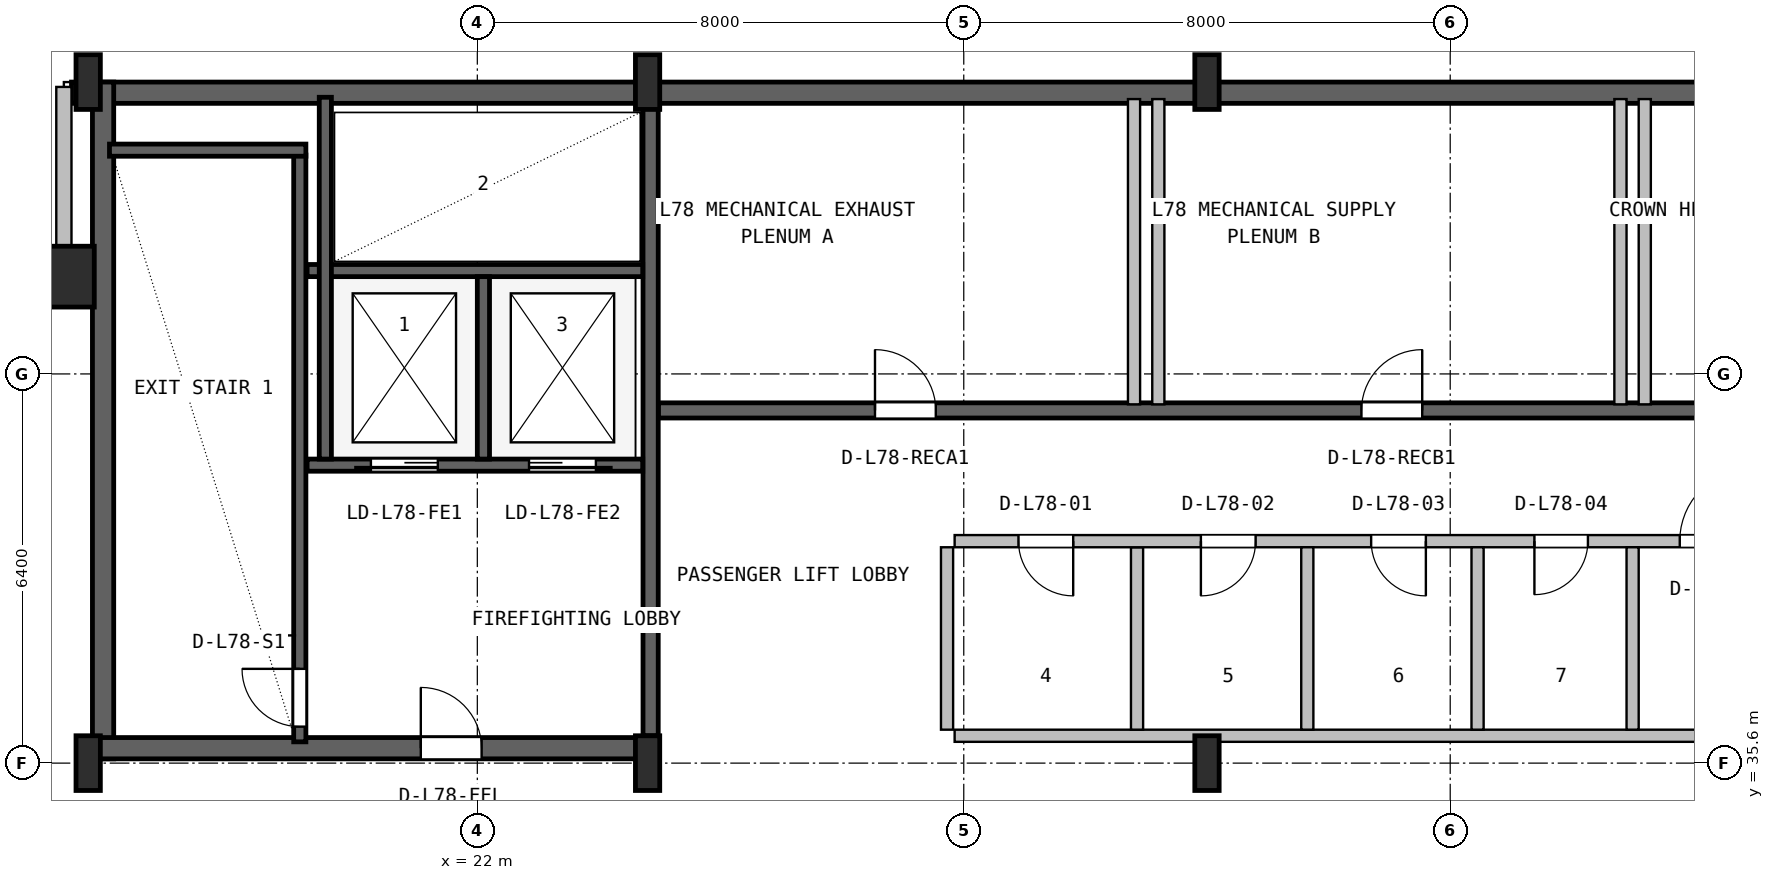
"""IFC4 building model, lengths in metres.
Left out: names, types, materials, properties, quantities, classifications, styles, units other than length and angle.
Written with IfcOpenShell. Run it as: python <this file> out.ifc"""

import sys

from ifc_helpers import new_model, si_unit, direction, frame, frame_2d, origin, origin_2d, place, context, subcontext, project, spatial, rectangle, hollow_rectangle, i_section, extrude, source, transform, mapped, element, fill, save


model = new_model("IFC4")
c1 = context("Model", 3, precision=1e-05, world=origin(), true_north=direction((0.0, 1.0)))
c2 = subcontext(c1, "Body", "Model", "MODEL_VIEW")
j1 = project(units=[si_unit("LENGTHUNIT", "METRE"), si_unit("PLANEANGLEUNIT", "RADIAN")], contexts=[c1])
p1 = place(None, origin())
s1 = spatial("IfcSite", under=j1, at=p1, CompositionType="ELEMENT")
p2 = place(p1, origin())
s2 = spatial("IfcBuilding", under=s1, at=p2, CompositionType="ELEMENT")
p3 = place(p2, frame((0.0, 0.0, 314.6)))
s3 = spatial("IfcBuildingStorey", under=s2, at=p3, CompositionType="ELEMENT", Elevation=314.6)
p4 = place(p3, frame((15.325, 46.625, 0.0), z_axis=(0.0, 0.0, 1.0), x_axis=(1.0, 0.0, 0.0)))
e1 = element("IfcWall", 1, at=p4, inside=s3, PredefinedType="SHEAR", context=c2, shape_type="SweptSolid", body=[
    extrude(rectangle(XDim=37.35, YDim=0.35, at=frame_2d((18.675, 0.0))), origin(), (0.0, 0.0, 1.0), 4.75),
])
p5 = place(p3, frame((15.845, 35.67, 0.0), z_axis=(0.0, 0.0, 1.0), x_axis=(0.0, 1.0, 0.0)))
e2 = element("IfcWall", 2, at=p5, inside=s3, PredefinedType="SHEAR", context=c2, shape_type="SweptSolid", body=[
    extrude(rectangle(XDim=11.13, YDim=0.35, at=frame_2d((5.565, 0.0))), origin(), (0.0, 0.0, 1.0), 4.75),
])
p6 = place(p3, frame((15.67, 35.845, 0.0), z_axis=(0.0, 0.0, 1.0), x_axis=(1.0, 0.0, 0.0)))
e3 = element("IfcWall", 3, at=p6, inside=s3, PredefinedType="SHEAR", context=c2, shape_type="SweptSolid", body=[
    extrude(rectangle(XDim=9.13, YDim=0.35, at=frame_2d((4.565, 0.0))), origin(), (0.0, 0.0, 1.0), 4.75),
])
p7 = place(p6, frame((5.4, 0.0, 0.0)))
e4 = element("IfcOpeningElement", 4, at=p7, cuts=e3, PredefinedType="OPENING", context=c2, shape_type="SweptSolid", body=[
    extrude(rectangle(XDim=1.0, YDim=2.1, at=frame_2d((0.5, 1.05))), frame((0.0, 0.185, 0.0), z_axis=(0.0, -1.0, 0.0), x_axis=(1.0, 0.0, 0.0)), (0.0, 0.0, 1.0), 0.37),
])
m1 = source(origin(), c2, "Body", "SweptSolid", [
    extrude(i_section(OverallWidth=0.4, OverallDepth=0.9, WebThickness=0.016, FlangeThickness=0.028, FilletRadius=0.016, at=origin_2d()), origin(), (0.0, 0.0, 1.0), 5.2),
])
for number, where, z_axis, x_axis in (
    (5, (15.6, 35.6, 0.0), (0.0, 0.0, 1.0), (1.0, 0.0, 0.0)),
    (6, (15.6, 46.8, 0.0), (0.0, 0.0, 1.0), (1.0, 0.0, 0.0)),
    (7, (24.8, 35.6, 0.0), (0.0, 0.0, 1.0), (1.0, 0.0, 0.0)),
    (8, (24.8, 46.8, 0.0), (0.0, 0.0, 1.0), (1.0, 0.0, 0.0)),
    (9, (34.0, 35.6, 0.0), (0.0, 0.0, 1.0), (1.0, 0.0, 0.0)),
    (10, (34.0, 46.8, 0.0), (0.0, 0.0, 1.0), (1.0, 0.0, 0.0)),
):
    element("IfcColumn", number, at=place(p3, frame(where, z_axis=z_axis, x_axis=x_axis)), inside=s3, PredefinedType="COLUMN", context=c2, shape_type="MappedRepresentation", body=[
        mapped(m1, transform((0.0, 0.0, 0.0), x_axis=(1.0, 0.0, 0.0), y_axis=(0.0, 1.0, 0.0), z_axis=(0.0, 0.0, 1.0), scale=1.0)),
    ])
m2 = source(origin(), c2, "Body", "SweptSolid", [
    extrude(hollow_rectangle(XDim=1.0, YDim=1.0, WallThickness=0.04, at=origin_2d()), origin(), (0.0, 0.0, 1.0), 5.2),
])
p8 = place(p3, frame((15.2, 43.6, 0.0), z_axis=(0.0, 0.0, 1.0), x_axis=(1.0, 0.0, 0.0)))
e11 = element("IfcColumn", 11, at=p8, inside=s3, PredefinedType="COLUMN", context=c2, shape_type="MappedRepresentation", body=[
    mapped(m2, transform((0.0, 0.0, 0.0), x_axis=(1.0, 0.0, 0.0), y_axis=(0.0, 1.0, 0.0), z_axis=(0.0, 0.0, 1.0), scale=1.0)),
])
p9 = place(p3, frame((12.08, 43.6, 0.0), z_axis=(0.0, 0.0, 1.0), x_axis=(1.0, 0.0, 0.0)))
e12 = element("IfcWall", 12, at=p9, inside=s3, PredefinedType="SOLIDWALL", context=c2, shape_type="SweptSolid", body=[
    extrude(rectangle(XDim=2.99, YDim=0.25, at=frame_2d((1.495, 0.0))), origin(), (0.0, 0.0, 1.0), 4.73),
])
p10 = place(p3, frame((15.2, 43.52, 0.0), z_axis=(0.0, 0.0, 1.0), x_axis=(0.0, 1.0, 0.0)))
e13 = element("IfcWall", 13, at=p10, inside=s3, PredefinedType="SOLIDWALL", context=c2, shape_type="SweptSolid", body=[
    extrude(rectangle(XDim=3.2, YDim=0.25, at=frame_2d((1.6, 0.0))), origin(), (0.0, 0.0, 1.0), 4.371),
])
p11 = place(p3, frame((19.08, 35.95, 0.0), z_axis=(0.0, 0.0, 1.0), x_axis=(0.0, 1.0, 0.0)))
e14 = element("IfcWall", 14, at=p11, inside=s3, PredefinedType="SHEAR", context=c2, shape_type="SweptSolid", body=[
    extrude(rectangle(XDim=9.65, YDim=0.2, at=frame_2d((4.825, 0.0))), origin(), (0.0, 0.0, 1.0), 4.75),
])
p12 = place(p11, frame((0.25, 0.0, 0.0)))
e15 = element("IfcOpeningElement", 15, at=p12, cuts=e14, PredefinedType="OPENING", context=c2, shape_type="SweptSolid", body=[
    extrude(rectangle(XDim=0.95, YDim=2.1, at=frame_2d((0.475, 1.05))), frame((0.0, 0.11, 0.0), z_axis=(0.0, -1.0, 0.0), x_axis=(1.0, 0.0, 0.0)), (0.0, 0.0, 1.0), 0.22),
])
p13 = place(p3, frame((15.95, 45.68, 0.0), z_axis=(0.0, 0.0, 1.0), x_axis=(1.0, 0.0, 0.0)))
e16 = element("IfcWall", 16, at=p13, inside=s3, PredefinedType="SHEAR", context=c2, shape_type="SweptSolid", body=[
    extrude(rectangle(XDim=3.23, YDim=0.2, at=frame_2d((1.615, 0.0))), origin(), (0.0, 0.0, 1.0), 4.75),
])
p14 = place(p3, frame((24.85, 36.05, 0.0), z_axis=(0.0, 0.0, 1.0), x_axis=(0.0, 1.0, 0.0)))
e17 = element("IfcWall", 17, at=p14, inside=s3, PredefinedType="SHEAR", context=c2, shape_type="SweptSolid", body=[
    extrude(rectangle(XDim=10.45, YDim=0.25, at=frame_2d((5.225, 0.0))), origin(), (0.0, 0.0, 1.0), 4.75),
])
p15 = place(p3, frame((19.2, 40.5, 0.0), z_axis=(0.0, 0.0, 1.0), x_axis=(1.0, 0.0, 0.0)))
e18 = element("IfcWall", 18, at=p15, inside=s3, PredefinedType="SHEAR", context=c2, shape_type="SweptSolid", body=[
    extrude(rectangle(XDim=5.52, YDim=0.2, at=frame_2d((2.76, 0.0))), origin(), (0.0, 0.0, 1.0), 4.75),
])
p16 = place(p15, frame((1.05, 0.0, 0.0)))
e19 = element("IfcOpeningElement", 19, at=p16, cuts=e18, PredefinedType="OPENING", context=c2, shape_type="SweptSolid", body=[
    extrude(rectangle(XDim=1.1, YDim=2.18, at=frame_2d((0.55, 1.09))), frame((0.0, 0.11, 0.0), z_axis=(0.0, -1.0, 0.0), x_axis=(1.0, 0.0, 0.0)), (0.0, 0.0, 1.0), 0.22),
])
p17 = place(p15, frame((3.65, 0.0, 0.0)))
e20 = element("IfcOpeningElement", 20, at=p17, cuts=e18, PredefinedType="OPENING", context=c2, shape_type="SweptSolid", body=[
    extrude(rectangle(XDim=1.1, YDim=2.18, at=frame_2d((0.55, 1.09))), frame((0.0, 0.11, 0.0), z_axis=(0.0, -1.0, 0.0), x_axis=(1.0, 0.0, 0.0)), (0.0, 0.0, 1.0), 0.22),
])
p18 = place(p3, frame((19.2, 43.7, 0.0), z_axis=(0.0, 0.0, 1.0), x_axis=(1.0, 0.0, 0.0)))
e21 = element("IfcWall", 21, at=p18, inside=s3, PredefinedType="SHEAR", context=c2, shape_type="SweptSolid", body=[
    extrude(rectangle(XDim=5.52, YDim=0.2, at=frame_2d((2.76, 0.0))), origin(), (0.0, 0.0, 1.0), 4.75),
])
p19 = place(p3, frame((22.1, 40.6, 0.0), z_axis=(0.0, 0.0, 1.0), x_axis=(0.0, 1.0, 0.0)))
e22 = element("IfcWall", 22, at=p19, inside=s3, PredefinedType="SHEAR", context=c2, shape_type="SweptSolid", body=[
    extrude(rectangle(XDim=3.0, YDim=0.2, at=frame_2d((1.5, 0.0))), origin(), (0.0, 0.0, 1.0), 4.75),
])
p20 = place(p3, frame((19.5, 40.6, 0.0), z_axis=(0.0, 0.0, 1.0), x_axis=(0.0, 1.0, 0.0)))
e23 = element("IfcWall", 23, at=p20, inside=s3, PredefinedType="SHEAR", context=c2, shape_type="SweptSolid", body=[
    extrude(rectangle(XDim=5.95, YDim=0.2, at=frame_2d((2.975, 0.0))), origin(), (0.0, 0.0, 1.0), 4.75),
])
p21 = place(p3, frame((24.98, 41.4, 0.0), z_axis=(0.0, 0.0, 1.0), x_axis=(1.0, 0.0, 0.0)))
e24 = element("IfcWall", 24, at=p21, inside=s3, PredefinedType="SHEAR", context=c2, shape_type="SweptSolid", body=[
    extrude(rectangle(XDim=23.82, YDim=0.25, at=frame_2d((11.91, 0.0))), origin(), (0.0, 0.0, 1.0), 4.75),
])
p22 = place(p21, frame((3.56, 0.0, 0.0)))
e25 = element("IfcOpeningElement", 25, at=p22, cuts=e24, PredefinedType="OPENING", context=c2, shape_type="SweptSolid", body=[
    extrude(rectangle(XDim=1.0, YDim=2.08, at=frame_2d((0.5, 1.04))), frame((0.0, 0.135, 0.0), z_axis=(0.0, -1.0, 0.0), x_axis=(1.0, 0.0, 0.0)), (0.0, 0.0, 1.0), 0.27),
])
p23 = place(p21, frame((11.56, 0.0, 0.0)))
e26 = element("IfcOpeningElement", 26, at=p23, cuts=e24, PredefinedType="OPENING", context=c2, shape_type="SweptSolid", body=[
    extrude(rectangle(XDim=1.0, YDim=2.08, at=frame_2d((0.5, 1.04))), frame((0.0, 0.135, 0.0), z_axis=(0.0, -1.0, 0.0), x_axis=(1.0, 0.0, 0.0)), (0.0, 0.0, 1.0), 0.27),
])
p24 = place(p21, frame((19.56, 0.0, 0.0)))
e27 = element("IfcOpeningElement", 27, at=p24, cuts=e24, PredefinedType="OPENING", context=c2, shape_type="SweptSolid", body=[
    extrude(rectangle(XDim=1.0, YDim=2.08, at=frame_2d((0.5, 1.04))), frame((0.0, 0.135, 0.0), z_axis=(0.0, -1.0, 0.0), x_axis=(1.0, 0.0, 0.0)), (0.0, 0.0, 1.0), 0.27),
])
p25 = place(p3, frame((29.85, 36.05, 0.0), z_axis=(0.0, 0.0, 1.0), x_axis=(1.0, 0.0, 0.0)))
e28 = element("IfcWall", 28, at=p25, inside=s3, PredefinedType="SOLIDWALL", context=c2, shape_type="SweptSolid", body=[
    extrude(rectangle(XDim=13.7, YDim=0.2, at=frame_2d((6.85, 0.0))), origin(), (0.0, 0.0, 1.0), 4.73),
])
p26 = place(p3, frame((32.85, 36.15, 0.0), z_axis=(0.0, 0.0, 1.0), x_axis=(0.0, 1.0, 0.0)))
e29 = element("IfcWall", 29, at=p26, inside=s3, PredefinedType="SOLIDWALL", context=c2, shape_type="SweptSolid", body=[
    extrude(rectangle(XDim=3.0, YDim=0.2, at=frame_2d((1.5, 0.0))), origin(), (0.0, 0.0, 1.0), 4.73),
])
p27 = place(p3, frame((29.85, 39.25, 0.0), z_axis=(0.0, 0.0, 1.0), x_axis=(1.0, 0.0, 0.0)))
e30 = element("IfcWall", 30, at=p27, inside=s3, PredefinedType="SOLIDWALL", context=c2, shape_type="SweptSolid", body=[
    extrude(rectangle(XDim=13.7, YDim=0.2, at=frame_2d((6.85, 0.0))), origin(), (0.0, 0.0, 1.0), 4.73),
])
p28 = place(p27, frame((1.05, 0.0, 0.0)))
e31 = element("IfcOpeningElement", 31, at=p28, cuts=e30, PredefinedType="OPENING", context=c2, shape_type="SweptSolid", body=[
    extrude(rectangle(XDim=0.9, YDim=2.06, at=frame_2d((0.45, 1.03))), frame((0.0, 0.11, 0.0), z_axis=(0.0, -1.0, 0.0), x_axis=(1.0, 0.0, 0.0)), (0.0, 0.0, 1.0), 0.22),
])
p29 = place(p27, frame((4.05, 0.0, 0.0)))
e32 = element("IfcOpeningElement", 32, at=p29, cuts=e30, PredefinedType="OPENING", context=c2, shape_type="SweptSolid", body=[
    extrude(rectangle(XDim=0.9, YDim=2.06, at=frame_2d((0.45, 1.03))), frame((0.0, 0.11, 0.0), z_axis=(0.0, -1.0, 0.0), x_axis=(1.0, 0.0, 0.0)), (0.0, 0.0, 1.0), 0.22),
])
p30 = place(p27, frame((6.85, 0.0, 0.0)))
e33 = element("IfcOpeningElement", 33, at=p30, cuts=e30, PredefinedType="OPENING", context=c2, shape_type="SweptSolid", body=[
    extrude(rectangle(XDim=0.9, YDim=2.06, at=frame_2d((0.45, 1.03))), frame((0.0, 0.11, 0.0), z_axis=(0.0, -1.0, 0.0), x_axis=(1.0, 0.0, 0.0)), (0.0, 0.0, 1.0), 0.22),
])
p31 = place(p27, frame((9.535, 0.0, 0.0)))
e34 = element("IfcOpeningElement", 34, at=p31, cuts=e30, PredefinedType="OPENING", context=c2, shape_type="SweptSolid", body=[
    extrude(rectangle(XDim=0.88, YDim=2.06, at=frame_2d((0.44, 1.03))), frame((0.0, 0.11, 0.0), z_axis=(0.0, -1.0, 0.0), x_axis=(1.0, 0.0, 0.0)), (0.0, 0.0, 1.0), 0.22),
])
p32 = place(p27, frame((11.925, 0.0, 0.0)))
e35 = element("IfcOpeningElement", 35, at=p32, cuts=e30, PredefinedType="OPENING", context=c2, shape_type="SweptSolid", body=[
    extrude(rectangle(XDim=1.2, YDim=2.1, at=frame_2d((0.6, 1.05))), frame((0.0, 0.11, 0.0), z_axis=(0.0, -1.0, 0.0), x_axis=(1.0, 0.0, 0.0)), (0.0, 0.0, 1.0), 0.22),
])
for number, where, z_axis, x_axis in (
    (36, (29.725, 36.15, 0.0), (0.0, 0.0, 1.0), (0.0, 1.0, 0.0)),
    (37, (35.65, 36.15, 0.0), (0.0, 0.0, 1.0), (0.0, 1.0, 0.0)),
    (38, (38.45, 36.15, 0.0), (0.0, 0.0, 1.0), (0.0, 1.0, 0.0)),
    (39, (41.0, 36.15, 0.0), (0.0, 0.0, 1.0), (0.0, 1.0, 0.0)),
):
    element("IfcWall", number, at=place(p3, frame(where, z_axis=z_axis, x_axis=x_axis)), inside=s3, PredefinedType="SOLIDWALL", context=c2, shape_type="SweptSolid", body=[
        extrude(rectangle(XDim=3.0, YDim=0.2, at=frame_2d((1.5, 0.0))), origin(), (0.0, 0.0, 1.0), 4.73),
    ])
for number, where, z_axis, x_axis in (
    (40, (32.8, 41.5, 0.0), (0.0, 0.0, 1.0), (0.0, 1.0, 0.0)),
    (41, (40.8, 41.5, 0.0), (0.0, 0.0, 1.0), (0.0, 1.0, 0.0)),
    (42, (33.2, 41.5, 0.0), (0.0, 0.0, 1.0), (0.0, 1.0, 0.0)),
    (43, (41.2, 41.5, 0.0), (0.0, 0.0, 1.0), (0.0, 1.0, 0.0)),
):
    element("IfcWall", number, at=place(p3, frame(where, z_axis=z_axis, x_axis=x_axis)), inside=s3, PredefinedType="SOLIDWALL", context=c2, shape_type="SweptSolid", body=[
        extrude(rectangle(XDim=5.02, YDim=0.2, at=frame_2d((2.51, 0.0))), origin(), (0.0, 0.0, 1.0), 3.525),
    ])
m3 = source(origin(), c2, "Body", "SweptSolid", [
    extrude(rectangle(XDim=0.95, YDim=2.1, at=frame_2d((0.475, 1.05))), frame((0.0, 0.025, 0.0), z_axis=(0.0, -1.0, 0.0), x_axis=(1.0, 0.0, 0.0)), (0.0, 0.0, 1.0), 0.05),
])
p33 = place(p12, origin())
e44 = element("IfcDoor", 44, at=p33, inside=s3, OperationType="SINGLE_SWING_RIGHT", PredefinedType="DOOR", context=c2, shape_type="MappedRepresentation", body=[
    mapped(m3, transform((0.0, 0.0, 0.0), x_axis=(1.0, 0.0, 0.0), y_axis=(0.0, 1.0, 0.0), z_axis=(0.0, 0.0, 1.0), scale=1.0)),
])
fill(e15, e44)
m4 = source(origin(), c2, "Body", "SweptSolid", [
    extrude(rectangle(XDim=1.0, YDim=2.1, at=frame_2d((0.5, 1.05))), frame((0.0, 0.025, 0.0), z_axis=(0.0, -1.0, 0.0), x_axis=(1.0, 0.0, 0.0)), (0.0, 0.0, 1.0), 0.05),
])
p34 = place(p7, origin())
e45 = element("IfcDoor", 45, at=p34, inside=s3, OperationType="SINGLE_SWING_LEFT", PredefinedType="DOOR", context=c2, shape_type="MappedRepresentation", body=[
    mapped(m4, transform((0.0, 0.0, 0.0), x_axis=(1.0, 0.0, 0.0), y_axis=(0.0, 1.0, 0.0), z_axis=(0.0, 0.0, 1.0), scale=1.0)),
])
fill(e4, e45)
m5 = source(origin(), c2, "Body", "SweptSolid", [
    extrude(rectangle(XDim=1.1, YDim=2.18, at=frame_2d((0.55, 1.09))), frame((0.0, 0.025, 0.0), z_axis=(0.0, -1.0, 0.0), x_axis=(1.0, 0.0, 0.0)), (0.0, 0.0, 1.0), 0.05),
])
p35 = place(p16, frame((1.1, 0.0, 0.0), z_axis=(0.0, 0.0, 1.0), x_axis=(-1.0, 0.0, 0.0)))
e46 = element("IfcDoor", 46, at=p35, inside=s3, OperationType="SLIDING_TO_LEFT", PredefinedType="DOOR", context=c2, shape_type="MappedRepresentation", body=[
    mapped(m5, transform((0.0, 0.0, 0.0), x_axis=(1.0, 0.0, 0.0), y_axis=(0.0, 1.0, 0.0), z_axis=(0.0, 0.0, 1.0), scale=1.0)),
])
fill(e19, e46)
p36 = place(p17, frame((1.1, 0.0, 0.0), z_axis=(0.0, 0.0, 1.0), x_axis=(-1.0, 0.0, 0.0)))
e47 = element("IfcDoor", 47, at=p36, inside=s3, OperationType="SLIDING_TO_RIGHT", PredefinedType="DOOR", context=c2, shape_type="MappedRepresentation", body=[
    mapped(m5, transform((0.0, 0.0, 0.0), x_axis=(1.0, 0.0, 0.0), y_axis=(0.0, 1.0, 0.0), z_axis=(0.0, 0.0, 1.0), scale=1.0)),
])
fill(e20, e47)
m6 = source(origin(), c2, "Body", "SweptSolid", [
    extrude(rectangle(XDim=1.0, YDim=2.08, at=frame_2d((0.5, 1.04))), frame((0.0, 0.025, 0.0), z_axis=(0.0, -1.0, 0.0), x_axis=(1.0, 0.0, 0.0)), (0.0, 0.0, 1.0), 0.05),
])
p37 = place(p22, origin())
e48 = element("IfcDoor", 48, at=p37, inside=s3, OperationType="SINGLE_SWING_LEFT", PredefinedType="DOOR", context=c2, shape_type="MappedRepresentation", body=[
    mapped(m6, transform((0.0, 0.0, 0.0), x_axis=(1.0, 0.0, 0.0), y_axis=(0.0, 1.0, 0.0), z_axis=(0.0, 0.0, 1.0), scale=1.0)),
])
fill(e25, e48)
p38 = place(p23, origin())
e49 = element("IfcDoor", 49, at=p38, inside=s3, OperationType="SINGLE_SWING_RIGHT", PredefinedType="DOOR", context=c2, shape_type="MappedRepresentation", body=[
    mapped(m6, transform((0.0, 0.0, 0.0), x_axis=(1.0, 0.0, 0.0), y_axis=(0.0, 1.0, 0.0), z_axis=(0.0, 0.0, 1.0), scale=1.0)),
])
fill(e26, e49)
m7 = source(origin(), c2, "Body", "SweptSolid", [
    extrude(rectangle(XDim=0.9, YDim=2.06, at=frame_2d((0.45, 1.03))), frame((0.0, 0.025, 0.0), z_axis=(0.0, -1.0, 0.0), x_axis=(1.0, 0.0, 0.0)), (0.0, 0.0, 1.0), 0.05),
])
p39 = place(p28, frame((0.9, 0.0, 0.0), z_axis=(0.0, 0.0, 1.0), x_axis=(-1.0, 0.0, 0.0)))
e50 = element("IfcDoor", 50, at=p39, inside=s3, OperationType="SINGLE_SWING_RIGHT", PredefinedType="DOOR", context=c2, shape_type="MappedRepresentation", body=[
    mapped(m7, transform((0.0, 0.0, 0.0), x_axis=(1.0, 0.0, 0.0), y_axis=(0.0, 1.0, 0.0), z_axis=(0.0, 0.0, 1.0), scale=1.0)),
])
fill(e31, e50)
p40 = place(p29, frame((0.9, 0.0, 0.0), z_axis=(0.0, 0.0, 1.0), x_axis=(-1.0, 0.0, 0.0)))
e51 = element("IfcDoor", 51, at=p40, inside=s3, OperationType="SINGLE_SWING_LEFT", PredefinedType="DOOR", context=c2, shape_type="MappedRepresentation", body=[
    mapped(m7, transform((0.0, 0.0, 0.0), x_axis=(1.0, 0.0, 0.0), y_axis=(0.0, 1.0, 0.0), z_axis=(0.0, 0.0, 1.0), scale=1.0)),
])
fill(e32, e51)
p41 = place(p30, frame((0.9, 0.0, 0.0), z_axis=(0.0, 0.0, 1.0), x_axis=(-1.0, 0.0, 0.0)))
e52 = element("IfcDoor", 52, at=p41, inside=s3, OperationType="SINGLE_SWING_RIGHT", PredefinedType="DOOR", context=c2, shape_type="MappedRepresentation", body=[
    mapped(m7, transform((0.0, 0.0, 0.0), x_axis=(1.0, 0.0, 0.0), y_axis=(0.0, 1.0, 0.0), z_axis=(0.0, 0.0, 1.0), scale=1.0)),
])
fill(e33, e52)
m8 = source(origin(), c2, "Body", "SweptSolid", [
    extrude(rectangle(XDim=0.88, YDim=2.06, at=frame_2d((0.44, 1.03))), frame((0.0, 0.025, 0.0), z_axis=(0.0, -1.0, 0.0), x_axis=(1.0, 0.0, 0.0)), (0.0, 0.0, 1.0), 0.05),
])
p42 = place(p31, frame((0.88, 0.0, 0.0), z_axis=(0.0, 0.0, 1.0), x_axis=(-1.0, 0.0, 0.0)))
e53 = element("IfcDoor", 53, at=p42, inside=s3, OperationType="SINGLE_SWING_LEFT", PredefinedType="DOOR", context=c2, shape_type="MappedRepresentation", body=[
    mapped(m8, transform((0.0, 0.0, 0.0), x_axis=(1.0, 0.0, 0.0), y_axis=(0.0, 1.0, 0.0), z_axis=(0.0, 0.0, 1.0), scale=1.0)),
])
fill(e34, e53)
m9 = source(origin(), c2, "Body", "SweptSolid", [
    extrude(rectangle(XDim=1.2, YDim=2.1, at=frame_2d((0.6, 1.05))), frame((0.0, 0.025, 0.0), z_axis=(0.0, -1.0, 0.0), x_axis=(1.0, 0.0, 0.0)), (0.0, 0.0, 1.0), 0.05),
])
p43 = place(p32, origin())
e54 = element("IfcDoor", 54, at=p43, inside=s3, OperationType="SINGLE_SWING_RIGHT", PredefinedType="DOOR", context=c2, shape_type="MappedRepresentation", body=[
    mapped(m9, transform((0.0, 0.0, 0.0), x_axis=(1.0, 0.0, 0.0), y_axis=(0.0, 1.0, 0.0), z_axis=(0.0, 0.0, 1.0), scale=1.0)),
])
fill(e35, e54)
save(model, sys.argv[1])
